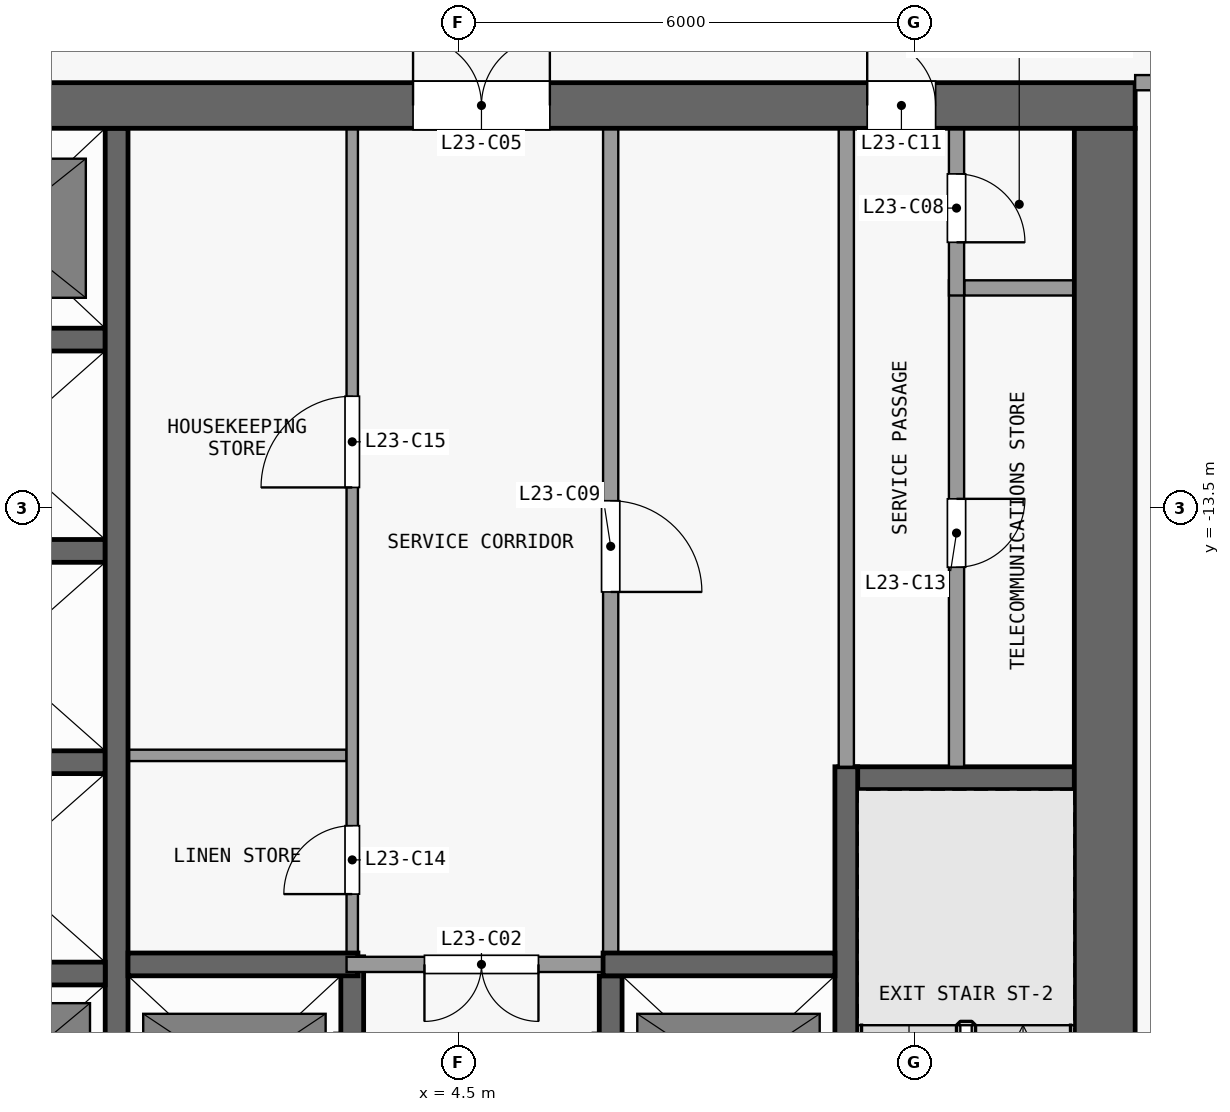
"""IFC4 building model, lengths in metres.
Left out: names, types, materials, properties, quantities, classifications, styles, units other than length and angle.
Written with IfcOpenShell. Run it as: python <this file> out.ifc"""

import sys

from ifc_helpers import new_model, si_unit, direction, frame, frame_2d, origin, place, context, subcontext, project, spatial, rectangle, extrude, element, fill, save


model = new_model("IFC4")
c1 = context("Model", 3, precision=1e-05, world=origin(), true_north=direction((0.0, 1.0)))
c2 = subcontext(c1, "Body", "Model", "MODEL_VIEW")
j1 = project(units=[si_unit("LENGTHUNIT", "METRE"), si_unit("PLANEANGLEUNIT", "RADIAN")], contexts=[c1])
p1 = place(None, origin())
s1 = spatial("IfcSite", under=j1, at=p1, CompositionType="ELEMENT")
p2 = place(p1, origin())
s2 = spatial("IfcBuilding", under=s1, at=p2, CompositionType="ELEMENT")
p3 = place(p2, frame((0.0, 0.0, 95.5)))
s3 = spatial("IfcBuildingStorey", under=s2, at=p3, CompositionType="ELEMENT", Elevation=95.5)
p4 = place(p3, frame((-13.4, -8.2, 0.0), z_axis=(0.0, 0.0, 1.0), x_axis=(1.0, 0.0, 0.0)))
e1 = element("IfcWall", 1, at=p4, inside=s3, PredefinedType="SHEAR", context=c2, shape_type="SweptSolid", body=[
    extrude(rectangle(XDim=26.8, YDim=0.6, at=frame_2d((13.4, 0.0))), origin(), (0.0, 0.0, 1.0), 3.3),
])
p5 = place(p4, frame((7.7, 0.0, 0.0)))
e2 = element("IfcOpeningElement", 2, at=p5, cuts=e1, PredefinedType="OPENING", context=c2, shape_type="SweptSolid", body=[
    extrude(rectangle(XDim=1.8, YDim=2.1, at=frame_2d((0.9, 1.05))), frame((0.0, 0.31, 0.0), z_axis=(0.0, -1.0, 0.0), x_axis=(1.0, 0.0, 0.0)), (0.0, 0.0, 1.0), 0.62),
])
p6 = place(p4, frame((17.3, 0.0, 0.0)))
e3 = element("IfcOpeningElement", 3, at=p6, cuts=e1, PredefinedType="OPENING", context=c2, shape_type="SweptSolid", body=[
    extrude(rectangle(XDim=1.8, YDim=2.1, at=frame_2d((0.9, 1.05))), frame((0.0, 0.31, 0.0), z_axis=(0.0, -1.0, 0.0), x_axis=(1.0, 0.0, 0.0)), (0.0, 0.0, 1.0), 0.62),
])
p7 = place(p4, frame((2.625, 0.0, 0.0)))
e4 = element("IfcOpeningElement", 4, at=p7, cuts=e1, PredefinedType="OPENING", context=c2, shape_type="SweptSolid", body=[
    extrude(rectangle(XDim=0.9, YDim=2.1, at=frame_2d((0.45, 1.05))), frame((0.0, 0.31, 0.0), z_axis=(0.0, -1.0, 0.0), x_axis=(1.0, 0.0, 0.0)), (0.0, 0.0, 1.0), 0.62),
])
p8 = place(p4, frame((23.275, 0.0, 0.0)))
e5 = element("IfcOpeningElement", 5, at=p8, cuts=e1, PredefinedType="OPENING", context=c2, shape_type="SweptSolid", body=[
    extrude(rectangle(XDim=0.9, YDim=2.1, at=frame_2d((0.45, 1.05))), frame((0.0, 0.31, 0.0), z_axis=(0.0, -1.0, 0.0), x_axis=(1.0, 0.0, 0.0)), (0.0, 0.0, 1.0), 0.62),
])
p9 = place(p3, frame((13.0, -24.6, 0.0), z_axis=(0.0, 0.0, 1.0), x_axis=(0.0, 1.0, 0.0)))
e6 = element("IfcWall", 6, at=p9, inside=s3, PredefinedType="SHEAR", context=c2, shape_type="SweptSolid", body=[
    extrude(rectangle(XDim=16.1, YDim=0.8, at=frame_2d((8.05, 0.0))), origin(), (0.0, 0.0, 1.0), 3.3),
])
p10 = place(p3, frame((-2.95, -19.62, 0.0), z_axis=(0.0, 0.0, 1.0), x_axis=(1.0, 0.0, 0.0)))
e7 = element("IfcWall", 7, at=p10, inside=s3, PredefinedType="SHEAR", context=c2, shape_type="SweptSolid", body=[
    extrude(rectangle(XDim=2.8, YDim=0.3, at=frame_2d((1.4, 0.0))), origin(), (0.0, 0.0, 1.0), 3.3),
])
p11 = place(p3, frame((0.15, -19.5, 0.0), z_axis=(0.0, 0.0, 1.0), x_axis=(1.0, 0.0, 0.0)))
e8 = element("IfcWall", 8, at=p11, inside=s3, PredefinedType="SHEAR", context=c2, shape_type="SweptSolid", body=[
    extrude(rectangle(XDim=3.025, YDim=0.3, at=frame_2d((1.513, 0.0))), origin(), (0.0, 0.0, 1.0), 3.3),
])
p12 = place(p3, frame((6.4, -19.5, 0.0), z_axis=(0.0, 0.0, 1.0), x_axis=(-1.0, 0.0, 0.0)))
e9 = element("IfcWall", 9, at=p12, inside=s3, PredefinedType="PARTITIONING", context=c2, shape_type="SweptSolid", body=[
    extrude(rectangle(XDim=3.375, YDim=0.2, at=frame_2d((1.688, 0.0))), origin(), (0.0, 0.0, 1.0), 3.3),
])
p13 = place(p12, frame((0.85, 0.0, 0.0)))
e10 = element("IfcOpeningElement", 10, at=p13, cuts=e9, PredefinedType="OPENING", context=c2, shape_type="SweptSolid", body=[
    extrude(rectangle(XDim=1.5, YDim=2.1, at=frame_2d((0.75, 1.05))), frame((0.0, 0.11, 0.0), z_axis=(0.0, -1.0, 0.0), x_axis=(1.0, 0.0, 0.0)), (0.0, 0.0, 1.0), 0.22),
])
p14 = place(p3, frame((6.4, -19.5, 0.0), z_axis=(0.0, 0.0, 1.0), x_axis=(1.0, 0.0, 0.0)))
e11 = element("IfcWall", 11, at=p14, inside=s3, PredefinedType="SHEAR", context=c2, shape_type="SweptSolid", body=[
    extrude(rectangle(XDim=3.05, YDim=0.3, at=frame_2d((1.525, 0.0))), origin(), (0.0, 0.0, 1.0), 3.3),
])
p15 = place(p3, frame((9.5, -17.05, 0.0), z_axis=(0.0, 0.0, 1.0), x_axis=(1.0, 0.0, 0.0)))
e12 = element("IfcWall", 12, at=p15, inside=s3, PredefinedType="SHEAR", context=c2, shape_type="SweptSolid", body=[
    extrude(rectangle(XDim=3.1, YDim=0.3, at=frame_2d((1.55, 0.0))), origin(), (0.0, 0.0, 1.0), 3.3),
])
p16 = place(p3, frame((-2.95, -16.84, 0.0), z_axis=(0.0, 0.0, 1.0), x_axis=(1.0, 0.0, 0.0)))
e13 = element("IfcWall", 13, at=p16, inside=s3, PredefinedType="SHEAR", context=c2, shape_type="SweptSolid", body=[
    extrude(rectangle(XDim=2.8, YDim=0.3, at=frame_2d((1.4, 0.0))), origin(), (0.0, 0.0, 1.0), 3.3),
])
p17 = place(p3, frame((0.15, -16.75, 0.0), z_axis=(0.0, 0.0, 1.0), x_axis=(1.0, 0.0, 0.0)))
e14 = element("IfcWall", 14, at=p17, inside=s3, PredefinedType="PARTITIONING", context=c2, shape_type="SweptSolid", body=[
    extrude(rectangle(XDim=2.875, YDim=0.15, at=frame_2d((1.438, 0.0))), origin(), (0.0, 0.0, 1.0), 3.3),
])
for number, where, z_axis, x_axis in (
    (15, (-2.95, -14.06, 0.0), (0.0, 0.0, 1.0), (1.0, 0.0, 0.0)),
    (16, (-2.95, -11.28, 0.0), (0.0, 0.0, 1.0), (1.0, 0.0, 0.0)),
):
    element("IfcWall", number, at=place(p3, frame(where, z_axis=z_axis, x_axis=x_axis)), inside=s3, PredefinedType="SHEAR", context=c2, shape_type="SweptSolid", body=[
        extrude(rectangle(XDim=2.8, YDim=0.3, at=frame_2d((1.4, 0.0))), origin(), (0.0, 0.0, 1.0), 3.3),
    ])
p18 = place(p3, frame((11.15, -10.6, 0.0), z_axis=(0.0, 0.0, 1.0), x_axis=(1.0, 0.0, 0.0)))
e17 = element("IfcWall", 17, at=p18, inside=s3, PredefinedType="PARTITIONING", context=c2, shape_type="SweptSolid", body=[
    extrude(rectangle(XDim=1.45, YDim=0.2, at=frame_2d((0.725, 0.0))), origin(), (0.0, 0.0, 1.0), 3.3),
])
p19 = place(p3, frame((0.0, -22.25, 0.0), z_axis=(0.0, 0.0, 1.0), x_axis=(0.0, 1.0, 0.0)))
e18 = element("IfcWall", 18, at=p19, inside=s3, PredefinedType="SHEAR", context=c2, shape_type="SweptSolid", body=[
    extrude(rectangle(XDim=13.75, YDim=0.3, at=frame_2d((6.875, 0.0))), origin(), (0.0, 0.0, 1.0), 3.3),
])
p20 = place(p3, frame((3.1, -22.25, 0.0), z_axis=(0.0, 0.0, 1.0), x_axis=(0.0, 1.0, 0.0)))
e19 = element("IfcWall", 19, at=p20, inside=s3, PredefinedType="SHEAR", context=c2, shape_type="SweptSolid", body=[
    extrude(rectangle(XDim=2.85, YDim=0.3, at=frame_2d((1.425, 0.0))), origin(), (0.0, 0.0, 1.0), 3.3),
])
p21 = place(p20, frame((0.75, 0.0, 0.0)))
e20 = element("IfcOpeningElement", 20, at=p21, cuts=e19, PredefinedType="OPENING", context=c2, shape_type="SweptSolid", body=[
    extrude(rectangle(XDim=1.1, YDim=2.1, at=frame_2d((0.55, 1.05))), frame((0.0, 0.16, 0.0), z_axis=(0.0, -1.0, 0.0), x_axis=(1.0, 0.0, 0.0)), (0.0, 0.0, 1.0), 0.32),
])
p22 = place(p3, frame((3.1, -19.4, 0.0), z_axis=(0.0, 0.0, 1.0), x_axis=(0.0, 1.0, 0.0)))
e21 = element("IfcWall", 21, at=p22, inside=s3, PredefinedType="PARTITIONING", context=c2, shape_type="SweptSolid", body=[
    extrude(rectangle(XDim=10.9, YDim=0.15, at=frame_2d((5.45, 0.0))), origin(), (0.0, 0.0, 1.0), 3.3),
])
p23 = place(p22, frame((0.825, 0.0, 0.0)))
e22 = element("IfcOpeningElement", 22, at=p23, cuts=e21, PredefinedType="OPENING", context=c2, shape_type="SweptSolid", body=[
    extrude(rectangle(XDim=0.9, YDim=2.1, at=frame_2d((0.45, 1.05))), frame((0.0, 0.085, 0.0), z_axis=(0.0, -1.0, 0.0), x_axis=(1.0, 0.0, 0.0)), (0.0, 0.0, 1.0), 0.17),
])
p24 = place(p22, frame((6.175, 0.0, 0.0)))
e23 = element("IfcOpeningElement", 23, at=p24, cuts=e21, PredefinedType="OPENING", context=c2, shape_type="SweptSolid", body=[
    extrude(rectangle(XDim=1.2, YDim=2.1, at=frame_2d((0.6, 1.05))), frame((0.0, 0.085, 0.0), z_axis=(0.0, -1.0, 0.0), x_axis=(1.0, 0.0, 0.0)), (0.0, 0.0, 1.0), 0.17),
])
p25 = place(p3, frame((6.5, -22.25, 0.0), z_axis=(0.0, 0.0, 1.0), x_axis=(0.0, 1.0, 0.0)))
e24 = element("IfcWall", 24, at=p25, inside=s3, PredefinedType="SHEAR", context=c2, shape_type="SweptSolid", body=[
    extrude(rectangle(XDim=2.6, YDim=0.3, at=frame_2d((1.3, 0.0))), origin(), (0.0, 0.0, 1.0), 3.3),
])
p26 = place(p25, frame((0.75, 0.0, 0.0)))
e25 = element("IfcOpeningElement", 25, at=p26, cuts=e24, PredefinedType="OPENING", context=c2, shape_type="SweptSolid", body=[
    extrude(rectangle(XDim=1.1, YDim=2.1, at=frame_2d((0.55, 1.05))), frame((0.0, 0.16, 0.0), z_axis=(0.0, -1.0, 0.0), x_axis=(1.0, 0.0, 0.0)), (0.0, 0.0, 1.0), 0.32),
])
p27 = place(p3, frame((6.5, -8.5, 0.0), z_axis=(0.0, 0.0, 1.0), x_axis=(0.0, -1.0, 0.0)))
e26 = element("IfcWall", 26, at=p27, inside=s3, PredefinedType="PARTITIONING", context=c2, shape_type="SweptSolid", body=[
    extrude(rectangle(XDim=10.85, YDim=0.2, at=frame_2d((5.425, 0.0))), origin(), (0.0, 0.0, 1.0), 3.3),
])
p28 = place(p27, frame((4.9, 0.0, 0.0)))
e27 = element("IfcOpeningElement", 27, at=p28, cuts=e26, PredefinedType="OPENING", context=c2, shape_type="SweptSolid", body=[
    extrude(rectangle(XDim=1.2, YDim=2.1, at=frame_2d((0.6, 1.05))), frame((0.0, 0.11, 0.0), z_axis=(0.0, -1.0, 0.0), x_axis=(1.0, 0.0, 0.0)), (0.0, 0.0, 1.0), 0.22),
])
p29 = place(p3, frame((9.6, -16.9, 0.0), z_axis=(0.0, 0.0, 1.0), x_axis=(0.0, -1.0, 0.0)))
e28 = element("IfcWall", 28, at=p29, inside=s3, PredefinedType="SHEAR", context=c2, shape_type="SweptSolid", body=[
    extrude(rectangle(XDim=7.7, YDim=0.3, at=frame_2d((3.85, 0.0))), origin(), (0.0, 0.0, 1.0), 3.3),
])
p30 = place(p29, frame((6.5, 0.0, 0.0)))
e29 = element("IfcOpeningElement", 29, at=p30, cuts=e28, PredefinedType="OPENING", context=c2, shape_type="SweptSolid", body=[
    extrude(rectangle(XDim=1.1, YDim=2.1, at=frame_2d((0.55, 1.05))), frame((0.0, 0.16, 0.0), z_axis=(0.0, -1.0, 0.0), x_axis=(1.0, 0.0, 0.0)), (0.0, 0.0, 1.0), 0.32),
])
p31 = place(p3, frame((9.6, -16.9, 0.0), z_axis=(0.0, 0.0, 1.0), x_axis=(0.0, 1.0, 0.0)))
e30 = element("IfcWall", 30, at=p31, inside=s3, PredefinedType="PARTITIONING", context=c2, shape_type="SweptSolid", body=[
    extrude(rectangle(XDim=8.4, YDim=0.2, at=frame_2d((4.2, 0.0))), origin(), (0.0, 0.0, 1.0), 3.3),
])
p32 = place(p3, frame((11.05, -10.5, 0.0), z_axis=(0.0, 0.0, 1.0), x_axis=(0.0, -1.0, 0.0)))
e31 = element("IfcWall", 31, at=p32, inside=s3, PredefinedType="PARTITIONING", context=c2, shape_type="SweptSolid", body=[
    extrude(rectangle(XDim=6.4, YDim=0.2, at=frame_2d((3.2, 0.0))), origin(), (0.0, 0.0, 1.0), 3.3),
])
p33 = place(p32, frame((2.875, 0.0, 0.0)))
e32 = element("IfcOpeningElement", 32, at=p33, cuts=e31, PredefinedType="OPENING", context=c2, shape_type="SweptSolid", body=[
    extrude(rectangle(XDim=0.9, YDim=2.1, at=frame_2d((0.45, 1.05))), frame((0.0, 0.11, 0.0), z_axis=(0.0, -1.0, 0.0), x_axis=(1.0, 0.0, 0.0)), (0.0, 0.0, 1.0), 0.22),
])
p34 = place(p3, frame((11.05, -8.5, 0.0), z_axis=(0.0, 0.0, 1.0), x_axis=(0.0, -1.0, 0.0)))
e33 = element("IfcWall", 33, at=p34, inside=s3, PredefinedType="PARTITIONING", context=c2, shape_type="SweptSolid", body=[
    extrude(rectangle(XDim=2.2, YDim=0.2, at=frame_2d((1.1, 0.0))), origin(), (0.0, 0.0, 1.0), 3.3),
])
p35 = place(p34, frame((0.6, 0.0, 0.0)))
e34 = element("IfcOpeningElement", 34, at=p35, cuts=e33, PredefinedType="OPENING", context=c2, shape_type="SweptSolid", body=[
    extrude(rectangle(XDim=0.9, YDim=2.1, at=frame_2d((0.45, 1.05))), frame((0.0, 0.11, 0.0), z_axis=(0.0, -1.0, 0.0), x_axis=(1.0, 0.0, 0.0)), (0.0, 0.0, 1.0), 0.22),
])
p36 = place(p3, frame((13.4, -7.9, 0.0), z_axis=(0.0, 0.0, 1.0), x_axis=(1.0, 0.0, 0.0)))
e35 = element("IfcWall", 35, at=p36, inside=s3, PredefinedType="PARTITIONING", context=c2, shape_type="SweptSolid", body=[
    extrude(rectangle(XDim=12.75, YDim=0.2, at=frame_2d((6.375, 0.0))), origin(), (0.0, 0.0, 1.0), 3.3),
])
p37 = place(p36, frame((1.0, 0.0, 0.0)))
e36 = element("IfcOpeningElement", 36, at=p37, cuts=e35, PredefinedType="OPENING", context=c2, shape_type="SweptSolid", body=[
    extrude(rectangle(XDim=1.0, YDim=2.1, at=frame_2d((0.5, 1.05))), frame((0.0, 0.11, 0.0), z_axis=(0.0, -1.0, 0.0), x_axis=(1.0, 0.0, 0.0)), (0.0, 0.0, 1.0), 0.22),
])
p38 = place(p13, origin())
e37 = element("IfcDoor", 37, at=p38, inside=s3, OperationType="DOUBLE_DOOR_SINGLE_SWING", PredefinedType="DOOR", context=c2, shape_type="SweptSolid", body=[
    extrude(rectangle(XDim=1.5, YDim=2.1, at=frame_2d((0.75, 1.05))), frame((0.0, 0.025, 0.0), z_axis=(0.0, -1.0, 0.0), x_axis=(1.0, 0.0, 0.0)), (0.0, 0.0, 1.0), 0.05),
])
fill(e10, e37)
p39 = place(p6, origin())
e38 = element("IfcDoor", 38, at=p39, inside=s3, OperationType="DOUBLE_DOOR_SINGLE_SWING", PredefinedType="DOOR", context=c2, shape_type="SweptSolid", body=[
    extrude(rectangle(XDim=1.8, YDim=2.1, at=frame_2d((0.9, 1.05))), frame((0.0, 0.025, 0.0), z_axis=(0.0, -1.0, 0.0), x_axis=(1.0, 0.0, 0.0)), (0.0, 0.0, 1.0), 0.05),
])
fill(e3, e38)
p40 = place(p35, origin())
e39 = element("IfcDoor", 39, at=p40, inside=s3, OperationType="SINGLE_SWING_RIGHT", PredefinedType="DOOR", context=c2, shape_type="SweptSolid", body=[
    extrude(rectangle(XDim=0.9, YDim=2.1, at=frame_2d((0.45, 1.05))), frame((0.0, 0.025, 0.0), z_axis=(0.0, -1.0, 0.0), x_axis=(1.0, 0.0, 0.0)), (0.0, 0.0, 1.0), 0.05),
])
fill(e34, e39)
p41 = place(p28, origin())
e40 = element("IfcDoor", 40, at=p41, inside=s3, OperationType="SINGLE_SWING_RIGHT", PredefinedType="DOOR", context=c2, shape_type="SweptSolid", body=[
    extrude(rectangle(XDim=1.2, YDim=2.1, at=frame_2d((0.6, 1.05))), frame((0.0, 0.025, 0.0), z_axis=(0.0, -1.0, 0.0), x_axis=(1.0, 0.0, 0.0)), (0.0, 0.0, 1.0), 0.05),
])
fill(e27, e40)
p42 = place(p8, origin())
e41 = element("IfcDoor", 41, at=p42, inside=s3, OperationType="SINGLE_SWING_LEFT", PredefinedType="DOOR", context=c2, shape_type="SweptSolid", body=[
    extrude(rectangle(XDim=0.9, YDim=2.1, at=frame_2d((0.45, 1.05))), frame((0.0, 0.025, 0.0), z_axis=(0.0, -1.0, 0.0), x_axis=(1.0, 0.0, 0.0)), (0.0, 0.0, 1.0), 0.05),
])
fill(e5, e41)
p43 = place(p33, origin())
e42 = element("IfcDoor", 42, at=p43, inside=s3, OperationType="SINGLE_SWING_LEFT", PredefinedType="DOOR", context=c2, shape_type="SweptSolid", body=[
    extrude(rectangle(XDim=0.9, YDim=2.1, at=frame_2d((0.45, 1.05))), frame((0.0, 0.025, 0.0), z_axis=(0.0, -1.0, 0.0), x_axis=(1.0, 0.0, 0.0)), (0.0, 0.0, 1.0), 0.05),
])
fill(e32, e42)
p44 = place(p23, origin())
e43 = element("IfcDoor", 43, at=p44, inside=s3, OperationType="SINGLE_SWING_LEFT", PredefinedType="DOOR", context=c2, shape_type="SweptSolid", body=[
    extrude(rectangle(XDim=0.9, YDim=2.1, at=frame_2d((0.45, 1.05))), frame((0.0, 0.025, 0.0), z_axis=(0.0, -1.0, 0.0), x_axis=(1.0, 0.0, 0.0)), (0.0, 0.0, 1.0), 0.05),
])
fill(e22, e43)
p45 = place(p24, origin())
e44 = element("IfcDoor", 44, at=p45, inside=s3, OperationType="SINGLE_SWING_LEFT", PredefinedType="DOOR", context=c2, shape_type="SweptSolid", body=[
    extrude(rectangle(XDim=1.2, YDim=2.1, at=frame_2d((0.6, 1.05))), frame((0.0, 0.025, 0.0), z_axis=(0.0, -1.0, 0.0), x_axis=(1.0, 0.0, 0.0)), (0.0, 0.0, 1.0), 0.05),
])
fill(e23, e44)
save(model, sys.argv[1])
